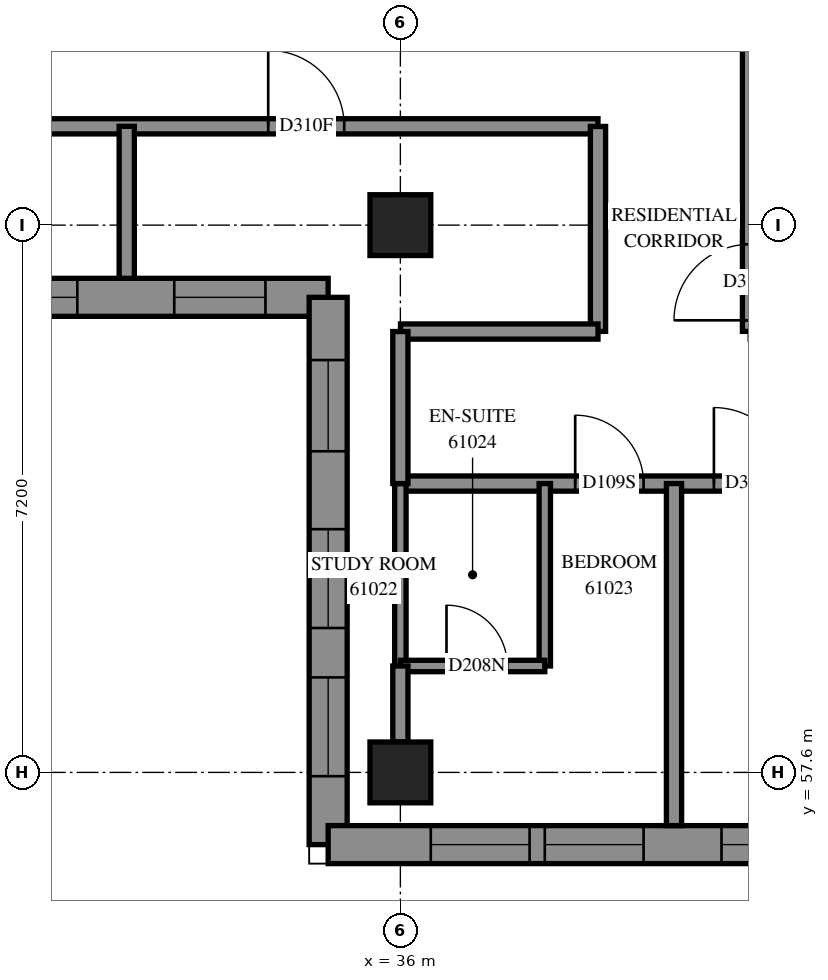
"""IFC4 building model, lengths in metres.
Left out: names, types, materials, properties, quantities, classifications, styles, units other than length and angle.
Written with IfcOpenShell. Run it as: python <this file> out.ifc"""

import sys

from ifc_helpers import new_model, si_unit, direction, frame, frame_2d, origin, origin_2d, place, context, subcontext, project, spatial, polyline, rectangle, outline, extrude, element, fill, save


model = new_model("IFC4")
c1 = context("Model", 3, precision=1e-05, world=origin(), true_north=direction((0.0, 1.0)))
c2 = subcontext(c1, "Body", "Model", "MODEL_VIEW")
j1 = project(units=[si_unit("LENGTHUNIT", "METRE"), si_unit("PLANEANGLEUNIT", "RADIAN")], contexts=[c1])
p1 = place(None, origin())
s1 = spatial("IfcSite", under=j1, at=p1, CompositionType="ELEMENT")
p2 = place(p1, origin())
s2 = spatial("IfcBuilding", under=s1, at=p2, CompositionType="ELEMENT")
p3 = place(p2, frame((0.0, 0.0, 223.6)))
s3 = spatial("IfcBuildingStorey", under=s2, at=p3, CompositionType="ELEMENT", Elevation=223.6)
for number, where, z_axis, x_axis in (
    (1, (36.0, 57.6, 0.0), (0.0, 0.0, 1.0), (1.0, 0.0, 0.0)),
    (2, (36.0, 64.8, 0.0), (0.0, 0.0, 1.0), (1.0, 0.0, 0.0)),
):
    element("IfcColumn", number, at=place(p3, frame(where, z_axis=z_axis, x_axis=x_axis)), inside=s3, PredefinedType="COLUMN", context=c2, shape_type="SweptSolid", body=[
        extrude(rectangle(XDim=0.8, YDim=0.8, at=origin_2d()), origin(), (0.0, 0.0, 1.0), 3.1),
    ])
p4 = place(p3, frame((26.647, 63.85, 0.0), z_axis=(0.0, 0.0, 1.0), x_axis=(1.0, 0.0, 0.0)))
e3 = element("IfcWall", 3, at=p4, inside=s3, PredefinedType="SOLIDWALL", context=c2, shape_type="SweptSolid", body=[
    extrude(outline(polyline([(-0.25, -0.25), (8.153, -0.25), (8.653, 0.25), (0.25, 0.25), (-0.25, -0.25)])), origin(), (0.0, 0.0, 1.0), 3.1),
])
p5 = place(p4, frame((2.303, 0.0, 0.45)))
e4 = element("IfcOpeningElement", 4, at=p5, cuts=e3, PredefinedType="OPENING", context=c2, shape_type="SweptSolid", body=[
    extrude(rectangle(XDim=1.3, YDim=2.5, at=frame_2d((0.65, 1.25))), frame((0.0, 0.26, 0.0), z_axis=(0.0, -1.0, 0.0), x_axis=(1.0, 0.0, 0.0)), (0.0, 0.0, 1.0), 0.52),
])
p6 = place(p4, frame((3.803, 0.0, 0.45)))
e5 = element("IfcOpeningElement", 5, at=p6, cuts=e3, PredefinedType="OPENING", context=c2, shape_type="SweptSolid", body=[
    extrude(rectangle(XDim=1.3, YDim=2.5, at=frame_2d((0.65, 1.25))), frame((0.0, 0.26, 0.0), z_axis=(0.0, -1.0, 0.0), x_axis=(1.0, 0.0, 0.0)), (0.0, 0.0, 1.0), 0.52),
])
p7 = place(p4, frame((0.702, 0.0, 0.45)))
e6 = element("IfcOpeningElement", 6, at=p7, cuts=e3, PredefinedType="OPENING", context=c2, shape_type="SweptSolid", body=[
    extrude(rectangle(XDim=1.2, YDim=2.5, at=frame_2d((0.6, 1.25))), frame((0.0, 0.26, 0.0), z_axis=(0.0, -1.0, 0.0), x_axis=(1.0, 0.0, 0.0)), (0.0, 0.0, 1.0), 0.52),
])
p8 = place(p4, frame((6.378, 0.0, 0.45)))
e7 = element("IfcOpeningElement", 7, at=p8, cuts=e3, PredefinedType="OPENING", context=c2, shape_type="SweptSolid", body=[
    extrude(rectangle(XDim=1.2, YDim=2.5, at=frame_2d((0.6, 1.25))), frame((0.0, 0.26, 0.0), z_axis=(0.0, -1.0, 0.0), x_axis=(1.0, 0.0, 0.0)), (0.0, 0.0, 1.0), 0.52),
])
p9 = place(p3, frame((35.05, 63.85, 0.0), z_axis=(0.0, 0.0, 1.0), x_axis=(0.0, -1.0, 0.0)))
e8 = element("IfcWall", 8, at=p9, inside=s3, PredefinedType="SOLIDWALL", context=c2, shape_type="SweptSolid", body=[
    extrude(outline(polyline([(0.25, -0.25), (7.45, -0.25), (6.95, 0.25), (-0.25, 0.25), (0.25, -0.25)])), origin(), (0.0, 0.0, 1.0), 3.1),
])
p10 = place(p9, frame((3.05, 0.0, 0.45)))
e9 = element("IfcOpeningElement", 9, at=p10, cuts=e8, PredefinedType="OPENING", context=c2, shape_type="SweptSolid", body=[
    extrude(rectangle(XDim=1.3, YDim=2.5, at=frame_2d((0.65, 1.25))), frame((0.0, 0.26, 0.0), z_axis=(0.0, -1.0, 0.0), x_axis=(1.0, 0.0, 0.0)), (0.0, 0.0, 1.0), 0.52),
])
p11 = place(p9, frame((5.0, 0.0, 0.45)))
e10 = element("IfcOpeningElement", 10, at=p11, cuts=e8, PredefinedType="OPENING", context=c2, shape_type="SweptSolid", body=[
    extrude(rectangle(XDim=1.3, YDim=2.5, at=frame_2d((0.65, 1.25))), frame((0.0, 0.26, 0.0), z_axis=(0.0, -1.0, 0.0), x_axis=(1.0, 0.0, 0.0)), (0.0, 0.0, 1.0), 0.52),
])
p12 = place(p9, frame((0.825, 0.0, 0.45)))
e11 = element("IfcOpeningElement", 11, at=p12, cuts=e8, PredefinedType="OPENING", context=c2, shape_type="SweptSolid", body=[
    extrude(rectangle(XDim=1.2, YDim=2.5, at=frame_2d((0.6, 1.25))), frame((0.0, 0.26, 0.0), z_axis=(0.0, -1.0, 0.0), x_axis=(1.0, 0.0, 0.0)), (0.0, 0.0, 1.0), 0.52),
])
p13 = place(p3, frame((35.05, 56.65, 0.0), z_axis=(0.0, 0.0, 1.0), x_axis=(1.0, 0.0, 0.0)))
e12 = element("IfcWall", 12, at=p13, inside=s3, PredefinedType="SOLIDWALL", context=c2, shape_type="SweptSolid", body=[
    extrude(outline(polyline([(-0.25, -0.25), (6.95, -0.25), (7.45, 0.25), (0.25, 0.25), (-0.25, -0.25)])), origin(), (0.0, 0.0, 1.0), 3.1),
])
p14 = place(p13, frame((1.35, 0.0, 0.45)))
e13 = element("IfcOpeningElement", 13, at=p14, cuts=e12, PredefinedType="OPENING", context=c2, shape_type="SweptSolid", body=[
    extrude(rectangle(XDim=1.3, YDim=2.5, at=frame_2d((0.65, 1.25))), frame((0.0, 0.26, 0.0), z_axis=(0.0, -1.0, 0.0), x_axis=(1.0, 0.0, 0.0)), (0.0, 0.0, 1.0), 0.52),
])
p15 = place(p13, frame((2.85, 0.0, 0.45)))
e14 = element("IfcOpeningElement", 14, at=p15, cuts=e12, PredefinedType="OPENING", context=c2, shape_type="SweptSolid", body=[
    extrude(rectangle(XDim=1.3, YDim=2.5, at=frame_2d((0.65, 1.25))), frame((0.0, 0.26, 0.0), z_axis=(0.0, -1.0, 0.0), x_axis=(1.0, 0.0, 0.0)), (0.0, 0.0, 1.0), 0.52),
])
p16 = place(p13, frame((5.175, 0.0, 0.45)))
e15 = element("IfcOpeningElement", 15, at=p16, cuts=e12, PredefinedType="OPENING", context=c2, shape_type="SweptSolid", body=[
    extrude(rectangle(XDim=1.2, YDim=2.5, at=frame_2d((0.6, 1.25))), frame((0.0, 0.26, 0.0), z_axis=(0.0, -1.0, 0.0), x_axis=(1.0, 0.0, 0.0)), (0.0, 0.0, 1.0), 0.52),
])
p17 = place(p3, frame((36.0, 61.4, 0.0), z_axis=(0.0, 0.0, 1.0), x_axis=(1.0, 0.0, 0.0)))
e16 = element("IfcWall", 16, at=p17, inside=s3, PredefinedType="PARTITIONING", context=c2, shape_type="SweptSolid", body=[
    extrude(rectangle(XDim=17.0, YDim=0.2, at=frame_2d((8.5, 0.0))), origin(), (0.0, 0.0, 1.0), 3.1),
])
p18 = place(p17, frame((2.3, 0.0, 0.0)))
e17 = element("IfcOpeningElement", 17, at=p18, cuts=e16, PredefinedType="OPENING", context=c2, shape_type="SweptSolid", body=[
    extrude(rectangle(XDim=0.9, YDim=2.1, at=frame_2d((0.45, 1.05))), frame((0.0, 0.11, 0.0), z_axis=(0.0, -1.0, 0.0), x_axis=(1.0, 0.0, 0.0)), (0.0, 0.0, 1.0), 0.22),
])
p19 = place(p17, frame((4.125, 0.0, 0.0)))
e18 = element("IfcOpeningElement", 18, at=p19, cuts=e16, PredefinedType="OPENING", context=c2, shape_type="SweptSolid", body=[
    extrude(rectangle(XDim=1.0, YDim=2.1, at=frame_2d((0.5, 1.05))), frame((0.0, 0.11, 0.0), z_axis=(0.0, -1.0, 0.0), x_axis=(1.0, 0.0, 0.0)), (0.0, 0.0, 1.0), 0.22),
])
p20 = place(p17, frame((9.5, 0.0, 0.0)))
e19 = element("IfcOpeningElement", 19, at=p20, cuts=e16, PredefinedType="OPENING", context=c2, shape_type="SweptSolid", body=[
    extrude(rectangle(XDim=0.9, YDim=2.1, at=frame_2d((0.45, 1.05))), frame((0.0, 0.11, 0.0), z_axis=(0.0, -1.0, 0.0), x_axis=(1.0, 0.0, 0.0)), (0.0, 0.0, 1.0), 0.22),
])
p21 = place(p17, frame((11.48, 0.0, 0.0)))
e20 = element("IfcOpeningElement", 20, at=p21, cuts=e16, PredefinedType="OPENING", context=c2, shape_type="SweptSolid", body=[
    extrude(rectangle(XDim=1.0, YDim=2.1, at=frame_2d((0.5, 1.05))), frame((0.0, 0.11, 0.0), z_axis=(0.0, -1.0, 0.0), x_axis=(1.0, 0.0, 0.0)), (0.0, 0.0, 1.0), 0.22),
])
p22 = place(p17, frame((15.805, 0.0, 0.0)))
e21 = element("IfcOpeningElement", 21, at=p22, cuts=e16, PredefinedType="OPENING", context=c2, shape_type="SweptSolid", body=[
    extrude(rectangle(XDim=1.0, YDim=2.1, at=frame_2d((0.5, 1.05))), frame((0.0, 0.11, 0.0), z_axis=(0.0, -1.0, 0.0), x_axis=(1.0, 0.0, 0.0)), (0.0, 0.0, 1.0), 0.22),
])
p23 = place(p3, frame((28.802, 66.1, 0.0), z_axis=(0.0, 0.0, 1.0), x_axis=(1.0, 0.0, 0.0)))
e22 = element("IfcWall", 22, at=p23, inside=s3, PredefinedType="PARTITIONING", context=c2, shape_type="SweptSolid", body=[
    extrude(rectangle(XDim=9.798, YDim=0.2, at=frame_2d((4.899, 0.0))), origin(), (0.0, 0.0, 1.0), 3.1),
])
p24 = place(p23, frame((0.449, 0.0, 0.0)))
e23 = element("IfcOpeningElement", 23, at=p24, cuts=e22, PredefinedType="OPENING", context=c2, shape_type="SweptSolid", body=[
    extrude(rectangle(XDim=1.0, YDim=2.1, at=frame_2d((0.5, 1.05))), frame((0.0, 0.11, 0.0), z_axis=(0.0, -1.0, 0.0), x_axis=(1.0, 0.0, 0.0)), (0.0, 0.0, 1.0), 0.22),
])
p25 = place(p23, frame((5.459, 0.0, 0.0)))
e24 = element("IfcOpeningElement", 24, at=p25, cuts=e22, PredefinedType="OPENING", context=c2, shape_type="SweptSolid", body=[
    extrude(rectangle(XDim=1.0, YDim=2.1, at=frame_2d((0.5, 1.05))), frame((0.0, 0.11, 0.0), z_axis=(0.0, -1.0, 0.0), x_axis=(1.0, 0.0, 0.0)), (0.0, 0.0, 1.0), 0.22),
])
p26 = place(p3, frame((40.6, 63.402, 0.0), z_axis=(0.0, 0.0, 1.0), x_axis=(0.0, 1.0, 0.0)))
e25 = element("IfcWall", 25, at=p26, inside=s3, PredefinedType="PARTITIONING", context=c2, shape_type="SweptSolid", body=[
    extrude(rectangle(XDim=4.698, YDim=0.2, at=frame_2d((2.349, 0.0))), origin(), (0.0, 0.0, 1.0), 3.1),
])
p27 = place(p26, frame((0.146, 0.0, 0.0)))
e26 = element("IfcOpeningElement", 26, at=p27, cuts=e25, PredefinedType="OPENING", context=c2, shape_type="SweptSolid", body=[
    extrude(rectangle(XDim=1.0, YDim=2.1, at=frame_2d((0.5, 1.05))), frame((0.0, 0.11, 0.0), z_axis=(0.0, -1.0, 0.0), x_axis=(1.0, 0.0, 0.0)), (0.0, 0.0, 1.0), 0.22),
])
p28 = place(p3, frame((39.6, 56.9, 0.0), z_axis=(0.0, 0.0, 1.0), x_axis=(0.0, 1.0, 0.0)))
e27 = element("IfcWall", 27, at=p28, inside=s3, PredefinedType="PARTITIONING", context=c2, shape_type="SweptSolid", body=[
    extrude(rectangle(XDim=4.5, YDim=0.2, at=frame_2d((2.25, 0.0))), origin(), (0.0, 0.0, 1.0), 3.1),
])
p29 = place(p3, frame((38.6, 63.402, 0.0), z_axis=(0.0, 0.0, 1.0), x_axis=(0.0, 1.0, 0.0)))
e28 = element("IfcWall", 28, at=p29, inside=s3, PredefinedType="PARTITIONING", context=c2, shape_type="SweptSolid", body=[
    extrude(rectangle(XDim=2.696, YDim=0.2, at=frame_2d((1.348, 0.0))), origin(), (0.0, 0.0, 1.0), 3.1),
])
p30 = place(p3, frame((36.002, 63.4, 0.0), z_axis=(0.0, 0.0, 1.0), x_axis=(1.0, 0.0, 0.0)))
e29 = element("IfcWall", 29, at=p30, inside=s3, PredefinedType="PARTITIONING", context=c2, shape_type="SweptSolid", body=[
    extrude(rectangle(XDim=2.598, YDim=0.2, at=frame_2d((1.299, 0.0))), origin(), (0.0, 0.0, 1.0), 3.1),
])
p31 = place(p3, frame((37.9, 59.0, 0.0), z_axis=(0.0, 0.0, 1.0), x_axis=(0.0, 1.0, 0.0)))
e30 = element("IfcWall", 30, at=p31, inside=s3, PredefinedType="PARTITIONING", context=c2, shape_type="SweptSolid", body=[
    extrude(rectangle(XDim=2.4, YDim=0.15, at=frame_2d((1.2, 0.0))), origin(), (0.0, 0.0, 1.0), 3.1),
])
p32 = place(p3, frame((36.0, 59.0, 0.0), z_axis=(0.0, 0.0, 1.0), x_axis=(0.0, 1.0, 0.0)))
e31 = element("IfcWall", 31, at=p32, inside=s3, PredefinedType="PARTITIONING", context=c2, shape_type="SweptSolid", body=[
    extrude(rectangle(XDim=2.4, YDim=0.15, at=frame_2d((1.2, 0.0))), origin(), (0.0, 0.0, 1.0), 2.6),
])
p33 = place(p3, frame((36.0, 61.4, 0.0), z_axis=(0.0, 0.0, 1.0), x_axis=(0.0, 1.0, 0.0)))
e32 = element("IfcWall", 32, at=p33, inside=s3, PredefinedType="PARTITIONING", context=c2, shape_type="SweptSolid", body=[
    extrude(rectangle(XDim=2.0, YDim=0.2, at=frame_2d((1.0, 0.0))), origin(), (0.0, 0.0, 1.0), 2.6),
])
p34 = place(p3, frame((32.4, 64.1, 0.0), z_axis=(0.0, 0.0, 1.0), x_axis=(0.0, 1.0, 0.0)))
e33 = element("IfcWall", 33, at=p34, inside=s3, PredefinedType="PARTITIONING", context=c2, shape_type="SweptSolid", body=[
    extrude(rectangle(XDim=2.0, YDim=0.2, at=frame_2d((1.0, 0.0))), origin(), (0.0, 0.0, 1.0), 3.1),
])
p35 = place(p3, frame((36.0, 59.0, 0.0), z_axis=(0.0, 0.0, 1.0), x_axis=(1.0, 0.0, 0.0)))
e34 = element("IfcWall", 34, at=p35, inside=s3, PredefinedType="PARTITIONING", context=c2, shape_type="SweptSolid", body=[
    extrude(rectangle(XDim=1.9, YDim=0.15, at=frame_2d((0.95, 0.0))), origin(), (0.0, 0.0, 1.0), 3.1),
])
p36 = place(p35, frame((0.607, 0.0, 0.0)))
e35 = element("IfcOpeningElement", 35, at=p36, cuts=e34, PredefinedType="OPENING", context=c2, shape_type="SweptSolid", body=[
    extrude(rectangle(XDim=0.8, YDim=2.1, at=frame_2d((0.4, 1.05))), frame((0.0, 0.085, 0.0), z_axis=(0.0, -1.0, 0.0), x_axis=(1.0, 0.0, 0.0)), (0.0, 0.0, 1.0), 0.17),
])
p37 = place(p3, frame((36.0, 58.0, 0.0), z_axis=(0.0, 0.0, 1.0), x_axis=(0.0, 1.0, 0.0)))
e36 = element("IfcWall", 36, at=p37, inside=s3, PredefinedType="PARTITIONING", context=c2, shape_type="SweptSolid", body=[
    extrude(rectangle(XDim=1.0, YDim=0.2, at=frame_2d((0.5, 0.0))), origin(), (0.0, 0.0, 1.0), 2.6),
])
p38 = place(p6, origin())
e37 = element("IfcWindow", 37, at=p38, inside=s3, PartitioningType="SINGLE_PANEL", PredefinedType="WINDOW", context=c2, shape_type="SweptSolid", body=[
    extrude(rectangle(XDim=1.3, YDim=2.5, at=frame_2d((0.65, 1.25))), frame((0.0, 0.18, 0.0), z_axis=(0.0, -1.0, 0.0), x_axis=(1.0, 0.0, 0.0)), (0.0, 0.0, 1.0), 0.06),
])
fill(e5, e37)
p39 = place(p8, origin())
e38 = element("IfcWindow", 38, at=p39, inside=s3, PartitioningType="SINGLE_PANEL", PredefinedType="WINDOW", context=c2, shape_type="SweptSolid", body=[
    extrude(rectangle(XDim=1.2, YDim=2.5, at=frame_2d((0.6, 1.25))), frame((0.0, 0.18, 0.0), z_axis=(0.0, -1.0, 0.0), x_axis=(1.0, 0.0, 0.0)), (0.0, 0.0, 1.0), 0.06),
])
fill(e7, e38)
p40 = place(p10, origin())
e39 = element("IfcWindow", 39, at=p40, inside=s3, PartitioningType="SINGLE_PANEL", PredefinedType="WINDOW", context=c2, shape_type="SweptSolid", body=[
    extrude(rectangle(XDim=1.3, YDim=2.5, at=frame_2d((0.65, 1.25))), frame((0.0, 0.18, 0.0), z_axis=(0.0, -1.0, 0.0), x_axis=(1.0, 0.0, 0.0)), (0.0, 0.0, 1.0), 0.06),
])
fill(e9, e39)
p41 = place(p11, origin())
e40 = element("IfcWindow", 40, at=p41, inside=s3, PartitioningType="SINGLE_PANEL", PredefinedType="WINDOW", context=c2, shape_type="SweptSolid", body=[
    extrude(rectangle(XDim=1.3, YDim=2.5, at=frame_2d((0.65, 1.25))), frame((0.0, 0.18, 0.0), z_axis=(0.0, -1.0, 0.0), x_axis=(1.0, 0.0, 0.0)), (0.0, 0.0, 1.0), 0.06),
])
fill(e10, e40)
p42 = place(p12, origin())
e41 = element("IfcWindow", 41, at=p42, inside=s3, PartitioningType="SINGLE_PANEL", PredefinedType="WINDOW", context=c2, shape_type="SweptSolid", body=[
    extrude(rectangle(XDim=1.2, YDim=2.5, at=frame_2d((0.6, 1.25))), frame((0.0, 0.18, 0.0), z_axis=(0.0, -1.0, 0.0), x_axis=(1.0, 0.0, 0.0)), (0.0, 0.0, 1.0), 0.06),
])
fill(e11, e41)
p43 = place(p14, origin())
e42 = element("IfcWindow", 42, at=p43, inside=s3, PartitioningType="SINGLE_PANEL", PredefinedType="WINDOW", context=c2, shape_type="SweptSolid", body=[
    extrude(rectangle(XDim=1.3, YDim=2.5, at=frame_2d((0.65, 1.25))), frame((0.0, 0.18, 0.0), z_axis=(0.0, -1.0, 0.0), x_axis=(1.0, 0.0, 0.0)), (0.0, 0.0, 1.0), 0.06),
])
fill(e13, e42)
p44 = place(p15, origin())
e43 = element("IfcWindow", 43, at=p44, inside=s3, PartitioningType="SINGLE_PANEL", PredefinedType="WINDOW", context=c2, shape_type="SweptSolid", body=[
    extrude(rectangle(XDim=1.3, YDim=2.5, at=frame_2d((0.65, 1.25))), frame((0.0, 0.18, 0.0), z_axis=(0.0, -1.0, 0.0), x_axis=(1.0, 0.0, 0.0)), (0.0, 0.0, 1.0), 0.06),
])
fill(e14, e43)
p45 = place(p16, origin())
e44 = element("IfcWindow", 44, at=p45, inside=s3, PartitioningType="SINGLE_PANEL", PredefinedType="WINDOW", context=c2, shape_type="SweptSolid", body=[
    extrude(rectangle(XDim=1.2, YDim=2.5, at=frame_2d((0.6, 1.25))), frame((0.0, 0.18, 0.0), z_axis=(0.0, -1.0, 0.0), x_axis=(1.0, 0.0, 0.0)), (0.0, 0.0, 1.0), 0.06),
])
fill(e15, e44)
p46 = place(p25, origin())
e45 = element("IfcDoor", 45, at=p46, inside=s3, OperationType="SINGLE_SWING_RIGHT", PredefinedType="DOOR", context=c2, shape_type="SweptSolid", body=[
    extrude(rectangle(XDim=1.0, YDim=2.1, at=frame_2d((0.5, 1.05))), frame((0.0, 0.025, 0.0), z_axis=(0.0, -1.0, 0.0), x_axis=(1.0, 0.0, 0.0)), (0.0, 0.0, 1.0), 0.05),
])
fill(e24, e45)
p47 = place(p18, origin())
e46 = element("IfcDoor", 46, at=p47, inside=s3, OperationType="SINGLE_SWING_LEFT", PredefinedType="DOOR", context=c2, shape_type="SweptSolid", body=[
    extrude(rectangle(XDim=0.9, YDim=2.1, at=frame_2d((0.45, 1.05))), frame((0.0, 0.025, 0.0), z_axis=(0.0, -1.0, 0.0), x_axis=(1.0, 0.0, 0.0)), (0.0, 0.0, 1.0), 0.05),
])
fill(e17, e46)
p48 = place(p36, origin())
e47 = element("IfcDoor", 47, at=p48, inside=s3, OperationType="SINGLE_SWING_RIGHT", PredefinedType="DOOR", context=c2, shape_type="SweptSolid", body=[
    extrude(rectangle(XDim=0.8, YDim=2.1, at=frame_2d((0.4, 1.05))), frame((0.0, 0.025, 0.0), z_axis=(0.0, -1.0, 0.0), x_axis=(1.0, 0.0, 0.0)), (0.0, 0.0, 1.0), 0.05),
])
fill(e35, e47)
p49 = place(p19, origin())
e48 = element("IfcDoor", 48, at=p49, inside=s3, OperationType="SINGLE_SWING_RIGHT", PredefinedType="DOOR", context=c2, shape_type="SweptSolid", body=[
    extrude(rectangle(XDim=1.0, YDim=2.1, at=frame_2d((0.5, 1.05))), frame((0.0, 0.025, 0.0), z_axis=(0.0, -1.0, 0.0), x_axis=(1.0, 0.0, 0.0)), (0.0, 0.0, 1.0), 0.05),
])
fill(e18, e48)
p50 = place(p27, origin())
e49 = element("IfcDoor", 49, at=p50, inside=s3, OperationType="SINGLE_SWING_LEFT", PredefinedType="DOOR", context=c2, shape_type="SweptSolid", body=[
    extrude(rectangle(XDim=1.0, YDim=2.1, at=frame_2d((0.5, 1.05))), frame((0.0, 0.025, 0.0), z_axis=(0.0, -1.0, 0.0), x_axis=(1.0, 0.0, 0.0)), (0.0, 0.0, 1.0), 0.05),
])
fill(e26, e49)
save(model, sys.argv[1])
